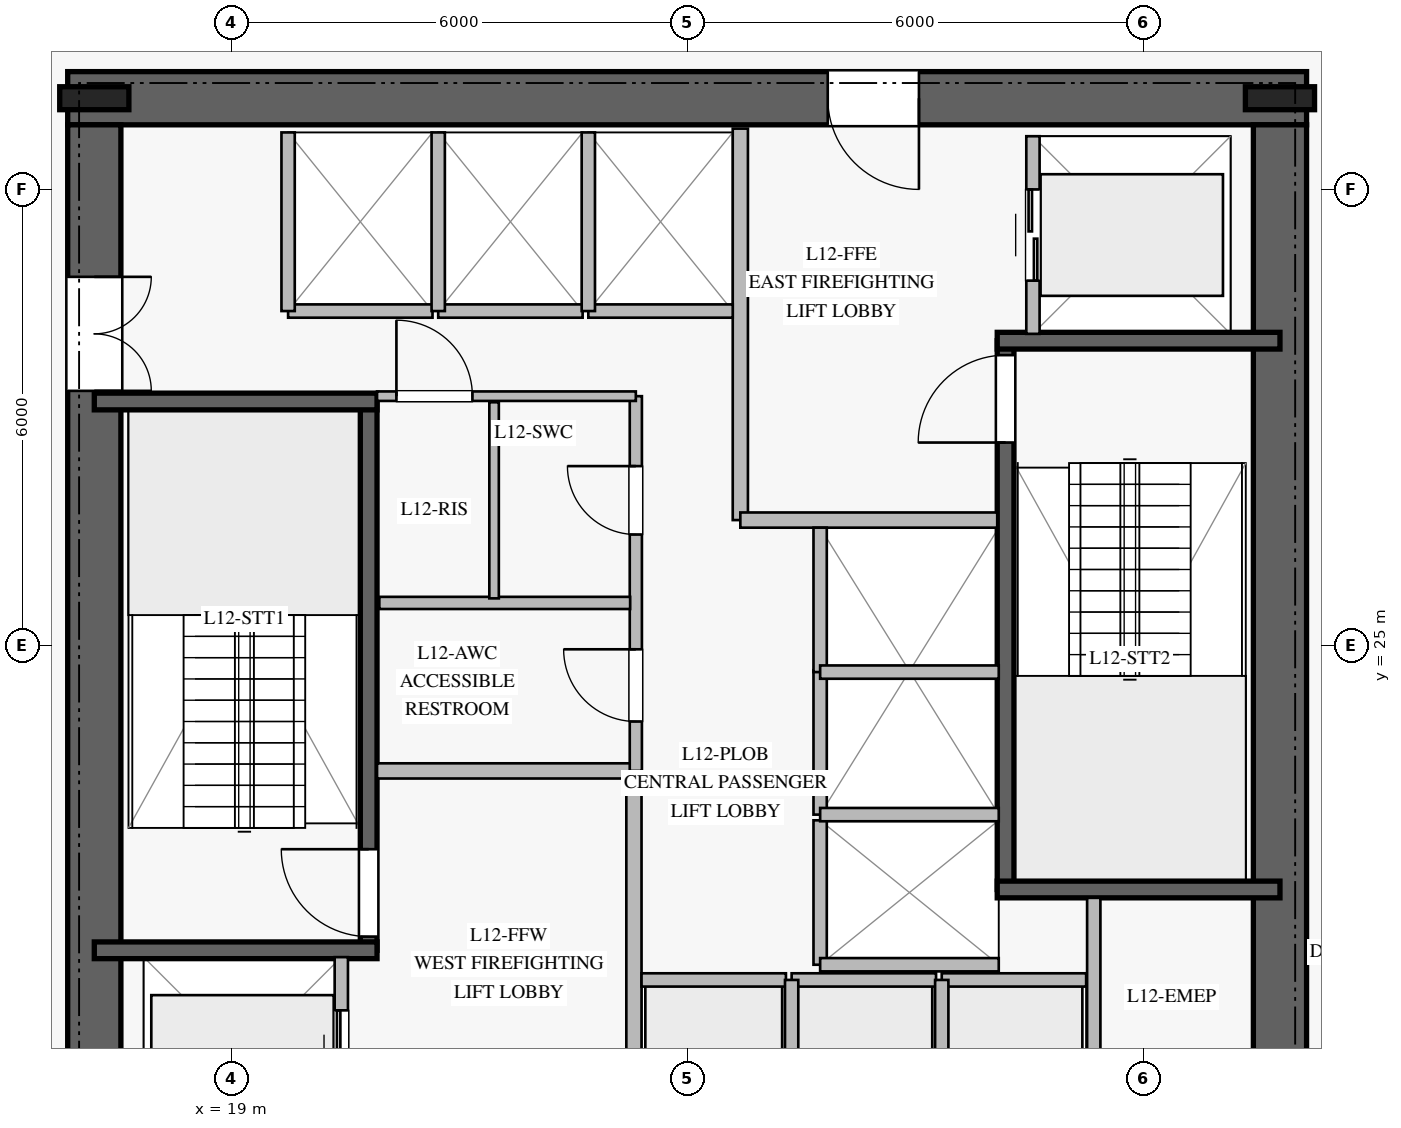
"""IFC4 building model, lengths in metres.
Left out: names, types, materials, properties, quantities, classifications, styles, units other than length and angle.
Written with IfcOpenShell. Run it as: python <this file> out.ifc"""

import sys

from ifc_helpers import new_model, si_unit, direction, frame, frame_2d, origin, origin_2d, place, context, subcontext, project, spatial, rectangle, i_section, extrude, element, fill, save


model = new_model("IFC4")
c1 = context("Model", 3, precision=1e-05, world=origin(), true_north=direction((0.0, 1.0)))
c2 = subcontext(c1, "Body", "Model", "MODEL_VIEW")
j1 = project(units=[si_unit("LENGTHUNIT", "METRE"), si_unit("PLANEANGLEUNIT", "RADIAN")], contexts=[c1])
p1 = place(None, origin())
s1 = spatial("IfcSite", under=j1, at=p1, CompositionType="ELEMENT")
p2 = place(p1, origin())
s2 = spatial("IfcBuilding", under=s1, at=p2, CompositionType="ELEMENT")
p3 = place(p2, frame((0.0, 0.0, 52.0)))
s3 = spatial("IfcBuildingStorey", under=s2, at=p3, CompositionType="ELEMENT", Elevation=52.0)
p4 = place(p3, frame((33.15, 32.2, 0.0), z_axis=(0.0, 0.0, 1.0), x_axis=(-1.0, 0.0, 0.0)))
e1 = element("IfcWall", 1, at=p4, inside=s3, PredefinedType="SHEAR", context=c2, shape_type="SweptSolid", body=[
    extrude(rectangle(XDim=16.3, YDim=0.7, at=frame_2d((8.15, 0.0))), origin(), (0.0, 0.0, 1.0), 3.76),
])
p5 = place(p4, frame((5.1, 0.0, 0.0)))
e2 = element("IfcOpeningElement", 2, at=p5, cuts=e1, PredefinedType="OPENING", context=c2, shape_type="SweptSolid", body=[
    extrude(rectangle(XDim=1.2, YDim=2.25, at=frame_2d((0.6, 1.125))), frame((0.0, 0.36, 0.0), z_axis=(0.0, -1.0, 0.0), x_axis=(1.0, 0.0, 0.0)), (0.0, 0.0, 1.0), 0.72),
])
p6 = place(p3, frame((17.2, 31.85, 0.0), z_axis=(0.0, 0.0, 1.0), x_axis=(0.0, -1.0, 0.0)))
e3 = element("IfcWall", 3, at=p6, inside=s3, PredefinedType="SHEAR", context=c2, shape_type="SweptSolid", body=[
    extrude(rectangle(XDim=13.7, YDim=0.7, at=frame_2d((6.85, 0.0))), origin(), (0.0, 0.0, 1.0), 3.76),
])
p7 = place(p6, frame((2.0, 0.0, 0.0)))
e4 = element("IfcOpeningElement", 4, at=p7, cuts=e3, PredefinedType="OPENING", context=c2, shape_type="SweptSolid", body=[
    extrude(rectangle(XDim=1.5, YDim=2.2, at=frame_2d((0.75, 1.1))), frame((0.0, 0.36, 0.0), z_axis=(0.0, -1.0, 0.0), x_axis=(1.0, 0.0, 0.0)), (0.0, 0.0, 1.0), 0.72),
])
p8 = place(p3, frame((32.8, 18.15, 0.0), z_axis=(0.0, 0.0, 1.0), x_axis=(0.0, 1.0, 0.0)))
e5 = element("IfcWall", 5, at=p8, inside=s3, PredefinedType="SHEAR", context=c2, shape_type="SweptSolid", body=[
    extrude(rectangle(XDim=13.7, YDim=0.7, at=frame_2d((6.85, 0.0))), origin(), (0.0, 0.0, 1.0), 3.76),
])
for number, where, z_axis, x_axis in (
    (6, (32.8, 32.2, 0.0), (0.0, 0.0, 1.0), (1.0, 0.0, 0.0)),
    (7, (17.2, 32.2, 0.0), (0.0, 0.0, 1.0), (1.0, 0.0, 0.0)),
):
    element("IfcColumn", number, at=place(p3, frame(where, z_axis=z_axis, x_axis=x_axis)), inside=s3, PredefinedType="COLUMN", context=c2, shape_type="SweptSolid", body=[
        extrude(i_section(OverallWidth=0.302, OverallDepth=0.91, WebThickness=0.021, FlangeThickness=0.04, at=origin_2d()), origin(), (0.0, 0.0, 1.0), 4.0),
    ])
p9 = place(p3, frame((20.81, 20.99, 0.0), z_axis=(0.0, 0.0, 1.0), x_axis=(0.0, 1.0, 0.0)))
e8 = element("IfcWall", 8, at=p9, inside=s3, PredefinedType="SOLIDWALL", context=c2, shape_type="SweptSolid", body=[
    extrude(rectangle(XDim=7.22, YDim=0.22, at=frame_2d((3.61, 0.0))), origin(), (0.0, 0.0, 1.0), 3.76),
])
p10 = place(p9, frame((0.18, 0.0, 0.0)))
e9 = element("IfcOpeningElement", 9, at=p10, cuts=e8, PredefinedType="OPENING", context=c2, shape_type="SweptSolid", body=[
    extrude(rectangle(XDim=1.15, YDim=2.2, at=frame_2d((0.575, 1.1))), frame((0.0, 0.12, 0.0), z_axis=(0.0, -1.0, 0.0), x_axis=(1.0, 0.0, 0.0)), (0.0, 0.0, 1.0), 0.24),
])
for number, where, z_axis, x_axis in (
    (10, (17.2, 20.99, 0.0), (0.0, 0.0, 1.0), (1.0, 0.0, 0.0)),
    (11, (17.2, 28.21, 0.0), (0.0, 0.0, 1.0), (1.0, 0.0, 0.0)),
):
    element("IfcWall", number, at=place(p3, frame(where, z_axis=z_axis, x_axis=x_axis)), inside=s3, PredefinedType="SOLIDWALL", context=c2, shape_type="SweptSolid", body=[
        extrude(rectangle(XDim=3.72, YDim=0.22, at=frame_2d((1.86, 0.0))), origin(), (0.0, 0.0, 1.0), 3.76),
    ])
p11 = place(p3, frame((29.19, 21.79, 0.0), z_axis=(0.0, 0.0, 1.0), x_axis=(0.0, 1.0, 0.0)))
e12 = element("IfcWall", 12, at=p11, inside=s3, PredefinedType="SOLIDWALL", context=c2, shape_type="SweptSolid", body=[
    extrude(rectangle(XDim=7.22, YDim=0.22, at=frame_2d((3.61, 0.0))), origin(), (0.0, 0.0, 1.0), 3.76),
])
p12 = place(p11, frame((5.88, 0.0, 0.0)))
e13 = element("IfcOpeningElement", 13, at=p12, cuts=e12, PredefinedType="OPENING", context=c2, shape_type="SweptSolid", body=[
    extrude(rectangle(XDim=1.15, YDim=2.2, at=frame_2d((0.575, 1.1))), frame((0.0, 0.12, 0.0), z_axis=(0.0, -1.0, 0.0), x_axis=(1.0, 0.0, 0.0)), (0.0, 0.0, 1.0), 0.24),
])
for number, where, z_axis, x_axis in (
    (14, (29.08, 21.79, 0.0), (0.0, 0.0, 1.0), (1.0, 0.0, 0.0)),
    (15, (29.08, 29.01, 0.0), (0.0, 0.0, 1.0), (1.0, 0.0, 0.0)),
):
    element("IfcWall", number, at=place(p3, frame(where, z_axis=z_axis, x_axis=x_axis)), inside=s3, PredefinedType="SOLIDWALL", context=c2, shape_type="SweptSolid", body=[
        extrude(rectangle(XDim=3.72, YDim=0.22, at=frame_2d((1.86, 0.0))), origin(), (0.0, 0.0, 1.0), 3.76),
    ])
p13 = place(p3, frame((24.3, 18.2, 0.0), z_axis=(0.0, 0.0, 1.0), x_axis=(0.0, 1.0, 0.0)))
e16 = element("IfcWall", 16, at=p13, inside=s3, PredefinedType="PARTITIONING", context=c2, shape_type="SweptSolid", body=[
    extrude(rectangle(XDim=5.15, YDim=0.2, at=frame_2d((2.575, 0.0))), origin(), (0.0, 0.0, 1.0), 3.76),
])
p14 = place(p3, frame((20.92, 23.35, 0.0), z_axis=(0.0, 0.0, 1.0), x_axis=(1.0, 0.0, 0.0)))
e17 = element("IfcWall", 17, at=p14, inside=s3, PredefinedType="PARTITIONING", context=c2, shape_type="SweptSolid", body=[
    extrude(rectangle(XDim=3.38, YDim=0.2, at=frame_2d((1.69, 0.0))), origin(), (0.0, 0.0, 1.0), 3.76),
])
p15 = place(p3, frame((25.7, 26.65, 0.0), z_axis=(0.0, 0.0, 1.0), x_axis=(0.0, 1.0, 0.0)))
e18 = element("IfcWall", 18, at=p15, inside=s3, PredefinedType="PARTITIONING", context=c2, shape_type="SweptSolid", body=[
    extrude(rectangle(XDim=5.15, YDim=0.2, at=frame_2d((2.575, 0.0))), origin(), (0.0, 0.0, 1.0), 3.76),
])
p16 = place(p3, frame((25.7, 26.65, 0.0), z_axis=(0.0, 0.0, 1.0), x_axis=(1.0, 0.0, 0.0)))
e19 = element("IfcWall", 19, at=p16, inside=s3, PredefinedType="PARTITIONING", context=c2, shape_type="SweptSolid", body=[
    extrude(rectangle(XDim=3.38, YDim=0.2, at=frame_2d((1.69, 0.0))), origin(), (0.0, 0.0, 1.0), 3.76),
])
p17 = place(p3, frame((24.325, 23.35, 0.0), z_axis=(0.0, 0.0, 1.0), x_axis=(0.0, 1.0, 0.0)))
e20 = element("IfcWall", 20, at=p17, inside=s3, PredefinedType="PLUMBINGWALL", context=c2, shape_type="SweptSolid", body=[
    extrude(rectangle(XDim=4.93, YDim=0.16, at=frame_2d((2.465, 0.0))), origin(), (0.0, 0.0, 1.0), 3.76),
])
p18 = place(p17, frame((0.65, 0.0, 0.0)))
e21 = element("IfcOpeningElement", 21, at=p18, cuts=e20, PredefinedType="OPENING", context=c2, shape_type="SweptSolid", body=[
    extrude(rectangle(XDim=0.95, YDim=2.1, at=frame_2d((0.475, 1.05))), frame((0.0, 0.09, 0.0), z_axis=(0.0, -1.0, 0.0), x_axis=(1.0, 0.0, 0.0)), (0.0, 0.0, 1.0), 0.18),
])
p19 = place(p17, frame((3.11, 0.0, 0.0)))
e22 = element("IfcOpeningElement", 22, at=p19, cuts=e20, PredefinedType="OPENING", context=c2, shape_type="SweptSolid", body=[
    extrude(rectangle(XDim=0.9, YDim=2.1, at=frame_2d((0.45, 1.05))), frame((0.0, 0.09, 0.0), z_axis=(0.0, -1.0, 0.0), x_axis=(1.0, 0.0, 0.0)), (0.0, 0.0, 1.0), 0.18),
])
p20 = place(p3, frame((20.92, 28.28, 0.0), z_axis=(0.0, 0.0, 1.0), x_axis=(1.0, 0.0, 0.0)))
e23 = element("IfcWall", 23, at=p20, inside=s3, PredefinedType="PARTITIONING", context=c2, shape_type="SweptSolid", body=[
    extrude(rectangle(XDim=3.405, YDim=0.125, at=frame_2d((1.703, 0.0))), origin(), (0.0, 0.0, 1.0), 3.76),
])
p21 = place(p20, frame((0.255, 0.0, 0.0)))
e24 = element("IfcOpeningElement", 24, at=p21, cuts=e23, PredefinedType="OPENING", context=c2, shape_type="SweptSolid", body=[
    extrude(rectangle(XDim=1.0, YDim=2.15, at=frame_2d((0.5, 1.075))), frame((0.0, 0.073, 0.0), z_axis=(0.0, -1.0, 0.0), x_axis=(1.0, 0.0, 0.0)), (0.0, 0.0, 1.0), 0.145),
])
p22 = place(p3, frame((20.95, 25.56, 0.0), z_axis=(0.0, 0.0, 1.0), x_axis=(1.0, 0.0, 0.0)))
e25 = element("IfcWall", 25, at=p22, inside=s3, PredefinedType="PLUMBINGWALL", context=c2, shape_type="SweptSolid", body=[
    extrude(rectangle(XDim=3.3, YDim=0.16, at=frame_2d((1.65, 0.0))), origin(), (0.0, 0.0, 1.0), 3.76),
])
p23 = place(p3, frame((22.46, 25.62, 0.0), z_axis=(0.0, 0.0, 1.0), x_axis=(0.0, 1.0, 0.0)))
e26 = element("IfcWall", 26, at=p23, inside=s3, PredefinedType="PARTITIONING", context=c2, shape_type="SweptSolid", body=[
    extrude(rectangle(XDim=2.58, YDim=0.125, at=frame_2d((1.29, 0.0))), origin(), (0.0, 0.0, 1.0), 3.76),
])
p24 = place(p3, frame((30.35, 18.2, 0.0), z_axis=(0.0, 0.0, 1.0), x_axis=(0.0, 1.0, 0.0)))
e27 = element("IfcWall", 27, at=p24, inside=s3, PredefinedType="PARTITIONING", context=c2, shape_type="SweptSolid", body=[
    extrude(rectangle(XDim=3.48, YDim=0.175, at=frame_2d((1.74, 0.0))), origin(), (0.0, 0.0, 1.0), 3.76),
])
p25 = place(p3, frame((24.4, 20.6, 0.0), z_axis=(0.0, 0.0, 1.0), x_axis=(1.0, 0.0, 0.0)))
e28 = element("IfcWall", 28, at=p25, inside=s3, PredefinedType="PARTITIONING", context=c2, shape_type="SweptSolid", body=[
    extrude(rectangle(XDim=1.9, YDim=0.175, at=frame_2d((0.95, 0.0))), origin(), (0.0, 0.0, 1.0), 3.76),
])
p26 = place(p3, frame((26.375, 20.6, 0.0), z_axis=(0.0, 0.0, 1.0), x_axis=(1.0, 0.0, 0.0)))
e29 = element("IfcWall", 29, at=p26, inside=s3, PredefinedType="PARTITIONING", context=c2, shape_type="SweptSolid", body=[
    extrude(rectangle(XDim=1.9, YDim=0.175, at=frame_2d((0.95, 0.0))), origin(), (0.0, 0.0, 1.0), 3.76),
])
p27 = place(p3, frame((26.375, 18.25, 0.0), z_axis=(0.0, 0.0, 1.0), x_axis=(0.0, 1.0, 0.0)))
e30 = element("IfcWall", 30, at=p27, inside=s3, PredefinedType="PARTITIONING", context=c2, shape_type="SweptSolid", body=[
    extrude(rectangle(XDim=2.35, YDim=0.175, at=frame_2d((1.175, 0.0))), origin(), (0.0, 0.0, 1.0), 3.76),
])
p28 = place(p3, frame((28.35, 20.6, 0.0), z_axis=(0.0, 0.0, 1.0), x_axis=(1.0, 0.0, 0.0)))
e31 = element("IfcWall", 31, at=p28, inside=s3, PredefinedType="PARTITIONING", context=c2, shape_type="SweptSolid", body=[
    extrude(rectangle(XDim=1.9, YDim=0.175, at=frame_2d((0.95, 0.0))), origin(), (0.0, 0.0, 1.0), 3.76),
])
p29 = place(p3, frame((28.35, 18.25, 0.0), z_axis=(0.0, 0.0, 1.0), x_axis=(0.0, 1.0, 0.0)))
e32 = element("IfcWall", 32, at=p29, inside=s3, PredefinedType="PARTITIONING", context=c2, shape_type="SweptSolid", body=[
    extrude(rectangle(XDim=2.35, YDim=0.175, at=frame_2d((1.175, 0.0))), origin(), (0.0, 0.0, 1.0), 3.76),
])
p30 = place(p3, frame((19.75, 29.4, 0.0), z_axis=(0.0, 0.0, 1.0), x_axis=(1.0, 0.0, 0.0)))
e33 = element("IfcWall", 33, at=p30, inside=s3, PredefinedType="PARTITIONING", context=c2, shape_type="SweptSolid", body=[
    extrude(rectangle(XDim=1.9, YDim=0.175, at=frame_2d((0.95, 0.0))), origin(), (0.0, 0.0, 1.0), 3.76),
])
p31 = place(p3, frame((19.75, 29.4, 0.0), z_axis=(0.0, 0.0, 1.0), x_axis=(0.0, 1.0, 0.0)))
e34 = element("IfcWall", 34, at=p31, inside=s3, PredefinedType="PARTITIONING", context=c2, shape_type="SweptSolid", body=[
    extrude(rectangle(XDim=2.35, YDim=0.175, at=frame_2d((1.175, 0.0))), origin(), (0.0, 0.0, 1.0), 3.76),
])
p32 = place(p3, frame((21.725, 29.4, 0.0), z_axis=(0.0, 0.0, 1.0), x_axis=(1.0, 0.0, 0.0)))
e35 = element("IfcWall", 35, at=p32, inside=s3, PredefinedType="PARTITIONING", context=c2, shape_type="SweptSolid", body=[
    extrude(rectangle(XDim=1.9, YDim=0.175, at=frame_2d((0.95, 0.0))), origin(), (0.0, 0.0, 1.0), 3.76),
])
p33 = place(p3, frame((21.725, 29.4, 0.0), z_axis=(0.0, 0.0, 1.0), x_axis=(0.0, 1.0, 0.0)))
e36 = element("IfcWall", 36, at=p33, inside=s3, PredefinedType="PARTITIONING", context=c2, shape_type="SweptSolid", body=[
    extrude(rectangle(XDim=2.35, YDim=0.175, at=frame_2d((1.175, 0.0))), origin(), (0.0, 0.0, 1.0), 3.76),
])
p34 = place(p3, frame((23.7, 29.4, 0.0), z_axis=(0.0, 0.0, 1.0), x_axis=(1.0, 0.0, 0.0)))
e37 = element("IfcWall", 37, at=p34, inside=s3, PredefinedType="PARTITIONING", context=c2, shape_type="SweptSolid", body=[
    extrude(rectangle(XDim=1.9, YDim=0.175, at=frame_2d((0.95, 0.0))), origin(), (0.0, 0.0, 1.0), 3.76),
])
p35 = place(p3, frame((23.7, 29.4, 0.0), z_axis=(0.0, 0.0, 1.0), x_axis=(0.0, 1.0, 0.0)))
e38 = element("IfcWall", 38, at=p35, inside=s3, PredefinedType="PARTITIONING", context=c2, shape_type="SweptSolid", body=[
    extrude(rectangle(XDim=2.35, YDim=0.175, at=frame_2d((1.175, 0.0))), origin(), (0.0, 0.0, 1.0), 3.76),
])
p36 = place(p3, frame((26.75, 20.8, 0.0), z_axis=(0.0, 0.0, 1.0), x_axis=(0.0, 1.0, 0.0)))
e39 = element("IfcWall", 39, at=p36, inside=s3, PredefinedType="PARTITIONING", context=c2, shape_type="SweptSolid", body=[
    extrude(rectangle(XDim=1.9, YDim=0.175, at=frame_2d((0.95, 0.0))), origin(), (0.0, 0.0, 1.0), 3.76),
])
p37 = place(p3, frame((26.75, 20.8, 0.0), z_axis=(0.0, 0.0, 1.0), x_axis=(1.0, 0.0, 0.0)))
e40 = element("IfcWall", 40, at=p37, inside=s3, PredefinedType="PARTITIONING", context=c2, shape_type="SweptSolid", body=[
    extrude(rectangle(XDim=2.35, YDim=0.175, at=frame_2d((1.175, 0.0))), origin(), (0.0, 0.0, 1.0), 3.76),
])
p38 = place(p3, frame((26.75, 22.775, 0.0), z_axis=(0.0, 0.0, 1.0), x_axis=(0.0, 1.0, 0.0)))
e41 = element("IfcWall", 41, at=p38, inside=s3, PredefinedType="PARTITIONING", context=c2, shape_type="SweptSolid", body=[
    extrude(rectangle(XDim=1.9, YDim=0.175, at=frame_2d((0.95, 0.0))), origin(), (0.0, 0.0, 1.0), 3.76),
])
p39 = place(p3, frame((26.75, 22.775, 0.0), z_axis=(0.0, 0.0, 1.0), x_axis=(1.0, 0.0, 0.0)))
e42 = element("IfcWall", 42, at=p39, inside=s3, PredefinedType="PARTITIONING", context=c2, shape_type="SweptSolid", body=[
    extrude(rectangle(XDim=2.35, YDim=0.175, at=frame_2d((1.175, 0.0))), origin(), (0.0, 0.0, 1.0), 3.76),
])
p40 = place(p3, frame((26.75, 24.65, 0.0), z_axis=(0.0, 0.0, 1.0), x_axis=(0.0, 1.0, 0.0)))
e43 = element("IfcWall", 43, at=p40, inside=s3, PredefinedType="PARTITIONING", context=c2, shape_type="SweptSolid", body=[
    extrude(rectangle(XDim=1.9, YDim=0.175, at=frame_2d((0.95, 0.0))), origin(), (0.0, 0.0, 1.0), 3.76),
])
p41 = place(p3, frame((26.75, 24.65, 0.0), z_axis=(0.0, 0.0, 1.0), x_axis=(1.0, 0.0, 0.0)))
e44 = element("IfcWall", 44, at=p41, inside=s3, PredefinedType="PARTITIONING", context=c2, shape_type="SweptSolid", body=[
    extrude(rectangle(XDim=2.35, YDim=0.175, at=frame_2d((1.175, 0.0))), origin(), (0.0, 0.0, 1.0), 3.76),
])
p42 = place(p3, frame((20.45, 18.3, 0.0), z_axis=(0.0, 0.0, 1.0), x_axis=(0.0, 1.0, 0.0)))
e45 = element("IfcWall", 45, at=p42, inside=s3, PredefinedType="PARTITIONING", context=c2, shape_type="SweptSolid", body=[
    extrude(rectangle(XDim=2.6, YDim=0.175, at=frame_2d((1.3, 0.0))), origin(), (0.0, 0.0, 1.0), 3.76),
])
p43 = place(p42, frame((0.7, 0.0, 0.0)))
e46 = element("IfcOpeningElement", 46, at=p43, cuts=e45, PredefinedType="OPENING", context=c2, shape_type="SweptSolid", body=[
    extrude(rectangle(XDim=1.2, YDim=2.2, at=frame_2d((0.6, 1.1))), frame((0.0, 0.098, 0.0), z_axis=(0.0, -1.0, 0.0), x_axis=(1.0, 0.0, 0.0)), (0.0, 0.0, 1.0), 0.195),
])
p44 = place(p3, frame((29.55, 29.1, 0.0), z_axis=(0.0, 0.0, 1.0), x_axis=(0.0, 1.0, 0.0)))
e47 = element("IfcWall", 47, at=p44, inside=s3, PredefinedType="PARTITIONING", context=c2, shape_type="SweptSolid", body=[
    extrude(rectangle(XDim=2.6, YDim=0.175, at=frame_2d((1.3, 0.0))), origin(), (0.0, 0.0, 1.0), 3.76),
])
p45 = place(p44, frame((0.7, 0.0, 0.0)))
e48 = element("IfcOpeningElement", 48, at=p45, cuts=e47, PredefinedType="OPENING", context=c2, shape_type="SweptSolid", body=[
    extrude(rectangle(XDim=1.2, YDim=2.2, at=frame_2d((0.6, 1.1))), frame((0.0, 0.098, 0.0), z_axis=(0.0, -1.0, 0.0), x_axis=(1.0, 0.0, 0.0)), (0.0, 0.0, 1.0), 0.195),
])
p46 = place(p10, origin())
e49 = element("IfcDoor", 49, at=p46, inside=s3, OperationType="SINGLE_SWING_RIGHT", PredefinedType="DOOR", context=c2, shape_type="SweptSolid", body=[
    extrude(rectangle(XDim=1.15, YDim=2.2, at=frame_2d((0.575, 1.1))), frame((0.0, 0.025, 0.0), z_axis=(0.0, -1.0, 0.0), x_axis=(1.0, 0.0, 0.0)), (0.0, 0.0, 1.0), 0.05),
])
fill(e9, e49)
p47 = place(p12, origin())
e50 = element("IfcDoor", 50, at=p47, inside=s3, OperationType="SINGLE_SWING_LEFT", PredefinedType="DOOR", context=c2, shape_type="SweptSolid", body=[
    extrude(rectangle(XDim=1.15, YDim=2.2, at=frame_2d((0.575, 1.1))), frame((0.0, 0.025, 0.0), z_axis=(0.0, -1.0, 0.0), x_axis=(1.0, 0.0, 0.0)), (0.0, 0.0, 1.0), 0.05),
])
fill(e13, e50)
p48 = place(p5, origin())
e51 = element("IfcDoor", 51, at=p48, inside=s3, OperationType="SINGLE_SWING_LEFT", PredefinedType="DOOR", context=c2, shape_type="SweptSolid", body=[
    extrude(rectangle(XDim=1.2, YDim=2.25, at=frame_2d((0.6, 1.125))), frame((0.0, 0.025, 0.0), z_axis=(0.0, -1.0, 0.0), x_axis=(1.0, 0.0, 0.0)), (0.0, 0.0, 1.0), 0.05),
])
fill(e2, e51)
p49 = place(p7, origin())
e52 = element("IfcDoor", 52, at=p49, inside=s3, OperationType="DOUBLE_DOOR_SINGLE_SWING", PredefinedType="DOOR", context=c2, shape_type="SweptSolid", body=[
    extrude(rectangle(XDim=1.5, YDim=2.2, at=frame_2d((0.75, 1.1))), frame((0.0, 0.025, 0.0), z_axis=(0.0, -1.0, 0.0), x_axis=(1.0, 0.0, 0.0)), (0.0, 0.0, 1.0), 0.05),
])
fill(e4, e52)
p50 = place(p18, origin())
e53 = element("IfcDoor", 53, at=p50, inside=s3, OperationType="SINGLE_SWING_RIGHT", PredefinedType="DOOR", context=c2, shape_type="SweptSolid", body=[
    extrude(rectangle(XDim=0.95, YDim=2.1, at=frame_2d((0.475, 1.05))), frame((0.0, 0.025, 0.0), z_axis=(0.0, -1.0, 0.0), x_axis=(1.0, 0.0, 0.0)), (0.0, 0.0, 1.0), 0.05),
])
fill(e21, e53)
p51 = place(p21, origin())
e54 = element("IfcDoor", 54, at=p51, inside=s3, OperationType="SINGLE_SWING_LEFT", PredefinedType="DOOR", context=c2, shape_type="SweptSolid", body=[
    extrude(rectangle(XDim=1.0, YDim=2.15, at=frame_2d((0.5, 1.075))), frame((0.0, 0.025, 0.0), z_axis=(0.0, -1.0, 0.0), x_axis=(1.0, 0.0, 0.0)), (0.0, 0.0, 1.0), 0.05),
])
fill(e24, e54)
p52 = place(p19, origin())
e55 = element("IfcDoor", 55, at=p52, inside=s3, OperationType="SINGLE_SWING_RIGHT", PredefinedType="DOOR", context=c2, shape_type="SweptSolid", body=[
    extrude(rectangle(XDim=0.9, YDim=2.1, at=frame_2d((0.45, 1.05))), frame((0.0, 0.025, 0.0), z_axis=(0.0, -1.0, 0.0), x_axis=(1.0, 0.0, 0.0)), (0.0, 0.0, 1.0), 0.05),
])
fill(e22, e55)
p53 = place(p43, origin())
e56 = element("IfcDoor", 56, at=p53, inside=s3, OperationType="DOUBLE_DOOR_SLIDING", PredefinedType="DOOR", context=c2, shape_type="SweptSolid", body=[
    extrude(rectangle(XDim=1.2, YDim=2.2, at=frame_2d((0.6, 1.1))), frame((0.0, 0.025, 0.0), z_axis=(0.0, -1.0, 0.0), x_axis=(1.0, 0.0, 0.0)), (0.0, 0.0, 1.0), 0.05),
])
fill(e46, e56)
p54 = place(p45, origin())
e57 = element("IfcDoor", 57, at=p54, inside=s3, OperationType="DOUBLE_DOOR_SLIDING", PredefinedType="DOOR", context=c2, shape_type="SweptSolid", body=[
    extrude(rectangle(XDim=1.2, YDim=2.2, at=frame_2d((0.6, 1.1))), frame((0.0, 0.025, 0.0), z_axis=(0.0, -1.0, 0.0), x_axis=(1.0, 0.0, 0.0)), (0.0, 0.0, 1.0), 0.05),
])
fill(e48, e57)
save(model, sys.argv[1])
